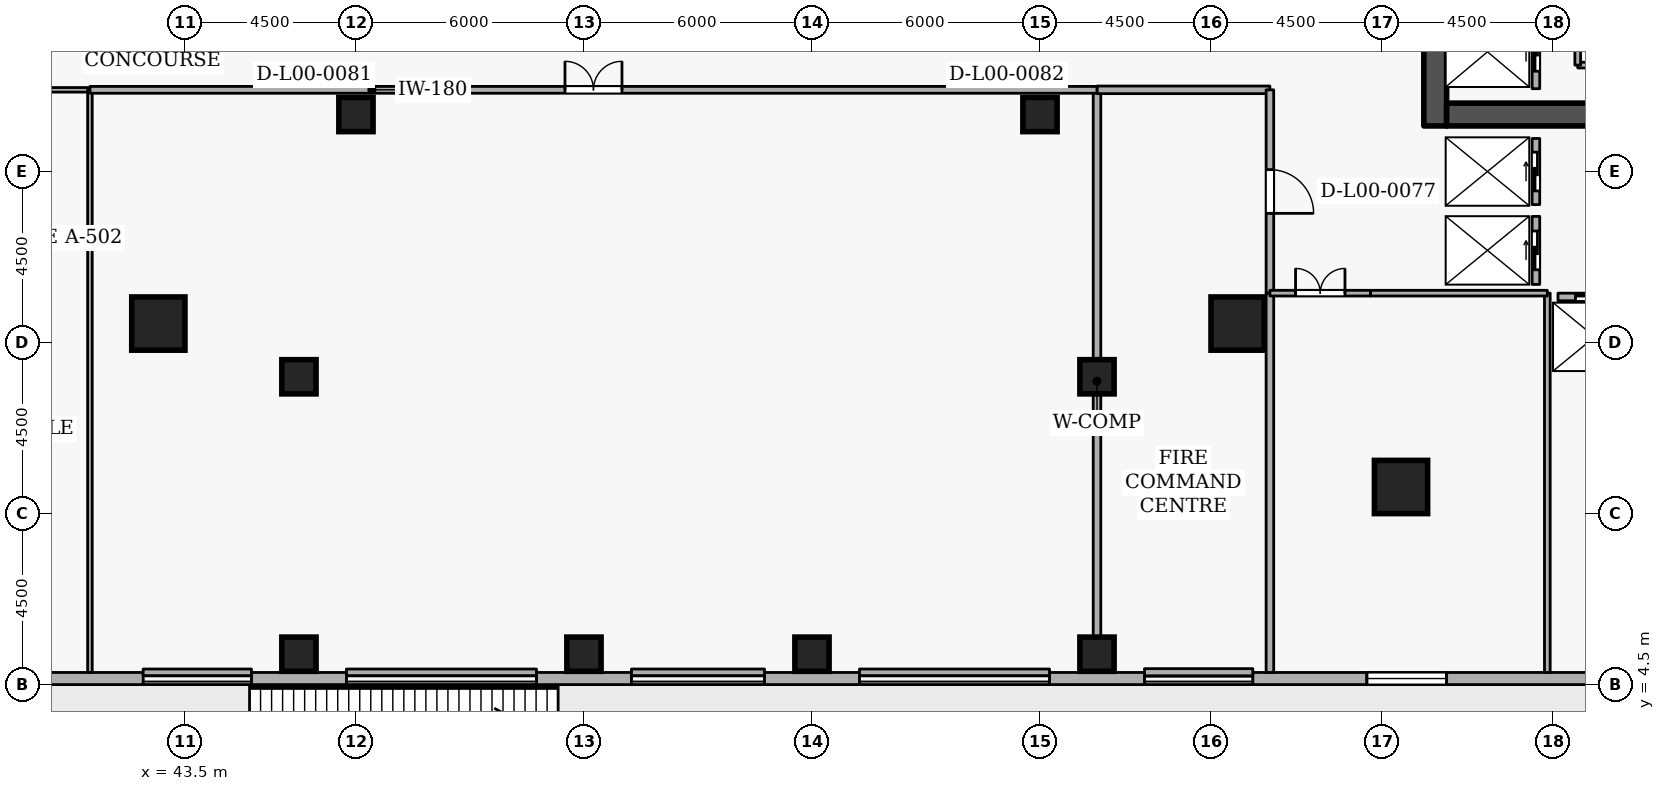
"""IFC4 building model, lengths in metres.
Left out: names, types, materials, properties, quantities, classifications, styles, units other than length and angle.
Written with IfcOpenShell. Run it as: python <this file> out.ifc"""

import sys

from ifc_helpers import new_model, si_unit, direction, frame, frame_2d, origin, origin_2d, place, context, subcontext, project, spatial, rectangle, extrude, element, fill, save


model = new_model("IFC4")
c1 = context("Model", 3, precision=1e-05, world=origin(), true_north=direction((0.0, 1.0)))
c2 = subcontext(c1, "Body", "Model", "MODEL_VIEW")
j1 = project(units=[si_unit("LENGTHUNIT", "METRE"), si_unit("PLANEANGLEUNIT", "RADIAN")], contexts=[c1])
p1 = place(None, origin())
s1 = spatial("IfcSite", under=j1, at=p1, CompositionType="ELEMENT")
p2 = place(p1, origin())
s2 = spatial("IfcBuilding", under=s1, at=p2, CompositionType="ELEMENT")
p3 = place(p2, origin())
s3 = spatial("IfcBuildingStorey", under=s2, at=p3, CompositionType="ELEMENT", Elevation=0.0)
p4 = place(p3, frame((76.4, 19.2, 0.0), z_axis=(0.0, 0.0, 1.0), x_axis=(0.0, 1.0, 0.0)))
e1 = element("IfcWall", 1, at=p4, inside=s3, PredefinedType="SHEAR", context=c2, shape_type="SweptSolid", body=[
    extrude(rectangle(XDim=15.6, YDim=0.6, at=frame_2d((7.8, 0.0))), origin(), (0.0, 0.0, 1.0), 4.8),
])
p5 = place(p3, frame((76.7, 19.5, 0.0), z_axis=(0.0, 0.0, 1.0), x_axis=(1.0, 0.0, 0.0)))
e2 = element("IfcWall", 2, at=p5, inside=s3, PredefinedType="SHEAR", context=c2, shape_type="SweptSolid", body=[
    extrude(rectangle(XDim=5.7, YDim=0.6, at=frame_2d((2.85, 0.0))), origin(), (0.0, 0.0, 1.0), 4.8),
])
for number, where, z_axis, x_axis in (
    (3, (42.8, 14.0, 0.0), (0.0, 0.0, 1.0), (1.0, 0.0, 0.0)),
    (4, (71.2, 14.0, 0.0), (0.0, 0.0, 1.0), (1.0, 0.0, 0.0)),
    (5, (75.5, 9.7, 0.0), (0.0, 0.0, 1.0), (1.0, 0.0, 0.0)),
):
    element("IfcColumn", number, at=place(p3, frame(where, z_axis=z_axis, x_axis=x_axis)), inside=s3, PredefinedType="COLUMN", context=c2, shape_type="SweptSolid", body=[
        extrude(rectangle(XDim=1.4, YDim=1.4, at=origin_2d()), origin(), (0.0, 0.0, 1.0), 4.8),
    ])
for number, where, z_axis, x_axis in (
    (6, (46.5, 5.3, 0.0), (0.0, 0.0, 1.0), (1.0, 0.0, 0.0)),
    (7, (54.0, 5.3, 0.0), (0.0, 0.0, 1.0), (1.0, 0.0, 0.0)),
    (8, (60.0, 5.3, 0.0), (0.0, 0.0, 1.0), (1.0, 0.0, 0.0)),
    (9, (67.5, 5.3, 0.0), (0.0, 0.0, 1.0), (1.0, 0.0, 0.0)),
    (10, (46.5, 12.6, 0.0), (0.0, 0.0, 1.0), (1.0, 0.0, 0.0)),
    (11, (67.5, 12.6, 0.0), (0.0, 0.0, 1.0), (1.0, 0.0, 0.0)),
    (12, (48.0, 19.5, 0.0), (0.0, 0.0, 1.0), (1.0, 0.0, 0.0)),
    (13, (66.0, 19.5, 0.0), (0.0, 0.0, 1.0), (1.0, 0.0, 0.0)),
):
    element("IfcColumn", number, at=place(p3, frame(where, z_axis=z_axis, x_axis=x_axis)), inside=s3, PredefinedType="COLUMN", context=c2, shape_type="SweptSolid", body=[
        extrude(rectangle(XDim=0.9, YDim=0.9, at=origin_2d()), origin(), (0.0, 0.0, 1.0), 4.8),
    ])
for number, where, z_axis, x_axis in (
    (14, (45.25, 4.66, 0.0), (0.0, 0.0, 1.0), (1.0, 0.0, 0.0)),
    (15, (52.75, 4.66, 0.0), (0.0, 0.0, 1.0), (1.0, 0.0, 0.0)),
    (16, (58.75, 4.66, 0.0), (0.0, 0.0, 1.0), (1.0, 0.0, 0.0)),
    (17, (66.25, 4.66, 0.0), (0.0, 0.0, 1.0), (1.0, 0.0, 0.0)),
):
    element("IfcWall", number, at=place(p3, frame(where, z_axis=z_axis, x_axis=x_axis)), inside=s3, PredefinedType="STANDARD", context=c2, shape_type="SweptSolid", body=[
        extrude(rectangle(XDim=2.5, YDim=0.32, at=frame_2d((1.25, 0.0))), origin(), (0.0, 0.0, 1.0), 3.86),
    ])
p6 = place(p3, frame((3.0, 4.66, 0.0), z_axis=(0.0, 0.0, 1.0), x_axis=(1.0, 0.0, 0.0)))
e18 = element("IfcWall", 18, at=p6, inside=s3, PredefinedType="STANDARD", context=c2, shape_type="SweptSolid", body=[
    extrude(rectangle(XDim=39.4, YDim=0.32, at=frame_2d((19.7, 0.0))), origin(), (0.0, 0.0, 1.0), 3.86),
])
p7 = place(p6, frame((14.3, 0.0, 0.0), z_axis=(0.0, 0.0, 1.0), x_axis=(-1.0, 0.0, 0.0)))
e19 = element("IfcOpeningElement", 19, at=p7, cuts=e18, PredefinedType="OPENING", context=c2, shape_type="SweptSolid", body=[
    extrude(rectangle(XDim=1.9, YDim=2.25, at=frame_2d((0.95, 1.125))), frame((0.0, 0.17, 0.0), z_axis=(0.0, -1.0, 0.0), x_axis=(1.0, 0.0, 0.0)), (0.0, 0.0, 1.0), 0.34),
])
p8 = place(p6, frame((9.1, 0.0, 0.0), z_axis=(0.0, 0.0, 1.0), x_axis=(-1.0, 0.0, 0.0)))
e20 = element("IfcOpeningElement", 20, at=p8, cuts=e18, PredefinedType="OPENING", context=c2, shape_type="SweptSolid", body=[
    extrude(rectangle(XDim=1.9, YDim=2.25, at=frame_2d((0.95, 1.125))), frame((0.0, 0.17, 0.0), z_axis=(0.0, -1.0, 0.0), x_axis=(1.0, 0.0, 0.0)), (0.0, 0.0, 1.0), 0.34),
])
p9 = place(p6, frame((35.1, 0.0, 0.0), z_axis=(0.0, 0.0, 1.0), x_axis=(-1.0, 0.0, 0.0)))
e21 = element("IfcOpeningElement", 21, at=p9, cuts=e18, PredefinedType="OPENING", context=c2, shape_type="SweptSolid", body=[
    extrude(rectangle(XDim=1.9, YDim=2.25, at=frame_2d((0.95, 1.125))), frame((0.0, 0.17, 0.0), z_axis=(0.0, -1.0, 0.0), x_axis=(1.0, 0.0, 0.0)), (0.0, 0.0, 1.0), 0.34),
])
p10 = place(p6, frame((3.0, 0.0, 0.78)))
e22 = element("IfcOpeningElement", 22, at=p10, cuts=e18, PredefinedType="OPENING", context=c2, shape_type="SweptSolid", body=[
    extrude(rectangle(XDim=2.1, YDim=2.4, at=frame_2d((1.05, 1.2))), frame((0.0, 0.17, 0.0), z_axis=(0.0, -1.0, 0.0), x_axis=(1.0, 0.0, 0.0)), (0.0, 0.0, 1.0), 0.34),
])
p11 = place(p6, frame((22.8, 0.0, 0.78)))
e23 = element("IfcOpeningElement", 23, at=p11, cuts=e18, PredefinedType="OPENING", context=c2, shape_type="SweptSolid", body=[
    extrude(rectangle(XDim=2.1, YDim=2.4, at=frame_2d((1.05, 1.2))), frame((0.0, 0.17, 0.0), z_axis=(0.0, -1.0, 0.0), x_axis=(1.0, 0.0, 0.0)), (0.0, 0.0, 1.0), 0.34),
])
p12 = place(p3, frame((71.6, 4.66, 0.0), z_axis=(0.0, 0.0, 1.0), x_axis=(1.0, 0.0, 0.0)))
e24 = element("IfcWall", 24, at=p12, inside=s3, PredefinedType="STANDARD", context=c2, shape_type="SweptSolid", body=[
    extrude(rectangle(XDim=39.4, YDim=0.32, at=frame_2d((19.7, 0.0))), origin(), (0.0, 0.0, 1.0), 3.86),
])
p13 = place(p12, frame((25.83, 0.0, 0.0), z_axis=(0.0, 0.0, 1.0), x_axis=(-1.0, 0.0, 0.0)))
e25 = element("IfcOpeningElement", 25, at=p13, cuts=e24, PredefinedType="OPENING", context=c2, shape_type="SweptSolid", body=[
    extrude(rectangle(XDim=1.9, YDim=2.25, at=frame_2d((0.95, 1.125))), frame((0.0, 0.17, 0.0), z_axis=(0.0, -1.0, 0.0), x_axis=(1.0, 0.0, 0.0)), (0.0, 0.0, 1.0), 0.34),
])
p14 = place(p12, frame((15.7, 0.0, 0.0), z_axis=(0.0, 0.0, 1.0), x_axis=(-1.0, 0.0, 0.0)))
e26 = element("IfcOpeningElement", 26, at=p14, cuts=e24, PredefinedType="OPENING", context=c2, shape_type="SweptSolid", body=[
    extrude(rectangle(XDim=1.9, YDim=2.25, at=frame_2d((0.95, 1.125))), frame((0.0, 0.17, 0.0), z_axis=(0.0, -1.0, 0.0), x_axis=(1.0, 0.0, 0.0)), (0.0, 0.0, 1.0), 0.34),
])
p15 = place(p12, frame((35.7, 0.0, 0.0), z_axis=(0.0, 0.0, 1.0), x_axis=(-1.0, 0.0, 0.0)))
e27 = element("IfcOpeningElement", 27, at=p15, cuts=e24, PredefinedType="OPENING", context=c2, shape_type="SweptSolid", body=[
    extrude(rectangle(XDim=1.9, YDim=2.25, at=frame_2d((0.95, 1.125))), frame((0.0, 0.17, 0.0), z_axis=(0.0, -1.0, 0.0), x_axis=(1.0, 0.0, 0.0)), (0.0, 0.0, 1.0), 0.34),
])
p16 = place(p12, frame((3.0, 0.0, 0.78)))
e28 = element("IfcOpeningElement", 28, at=p16, cuts=e24, PredefinedType="OPENING", context=c2, shape_type="SweptSolid", body=[
    extrude(rectangle(XDim=2.1, YDim=2.4, at=frame_2d((1.05, 1.2))), frame((0.0, 0.17, 0.0), z_axis=(0.0, -1.0, 0.0), x_axis=(1.0, 0.0, 0.0)), (0.0, 0.0, 1.0), 0.34),
])
p17 = place(p3, frame((79.05, 20.18, 0.0), z_axis=(0.0, 0.0, 1.0), x_axis=(0.0, 1.0, 0.0)))
e29 = element("IfcWall", 29, at=p17, inside=s3, PredefinedType="STANDARD", context=c2, shape_type="SweptSolid", body=[
    extrude(rectangle(XDim=1.94, YDim=0.2, at=frame_2d((0.97, 0.0))), origin(), (0.0, 0.0, 1.0), 4.46),
])
p18 = place(p17, frame((0.46, 0.0, 0.0)))
e30 = element("IfcOpeningElement", 30, at=p18, cuts=e29, PredefinedType="OPENING", context=c2, shape_type="SweptSolid", body=[
    extrude(rectangle(XDim=1.02, YDim=2.06, at=frame_2d((0.51, 1.03))), frame((0.0, 0.11, 0.0), z_axis=(0.0, -1.0, 0.0), x_axis=(1.0, 0.0, 0.0)), (0.0, 0.0, 1.0), 0.22),
])
p19 = place(p3, frame((79.05, 17.13, 0.0), z_axis=(0.0, 0.0, 1.0), x_axis=(0.0, 1.0, 0.0)))
e31 = element("IfcWall", 31, at=p19, inside=s3, PredefinedType="STANDARD", context=c2, shape_type="SweptSolid", body=[
    extrude(rectangle(XDim=1.74, YDim=0.2, at=frame_2d((0.87, 0.0))), origin(), (0.0, 0.0, 1.0), 4.46),
])
p20 = place(p19, frame((0.36, 0.0, 0.0)))
e32 = element("IfcOpeningElement", 32, at=p20, cuts=e31, PredefinedType="OPENING", context=c2, shape_type="SweptSolid", body=[
    extrude(rectangle(XDim=1.02, YDim=2.06, at=frame_2d((0.51, 1.03))), frame((0.0, 0.11, 0.0), z_axis=(0.0, -1.0, 0.0), x_axis=(1.0, 0.0, 0.0)), (0.0, 0.0, 1.0), 0.22),
])
p21 = place(p3, frame((79.05, 15.03, 0.0), z_axis=(0.0, 0.0, 1.0), x_axis=(0.0, 1.0, 0.0)))
e33 = element("IfcWall", 33, at=p21, inside=s3, PredefinedType="STANDARD", context=c2, shape_type="SweptSolid", body=[
    extrude(rectangle(XDim=1.79, YDim=0.2, at=frame_2d((0.895, 0.0))), origin(), (0.0, 0.0, 1.0), 4.46),
])
p22 = place(p21, frame((0.385, 0.0, 0.0)))
e34 = element("IfcOpeningElement", 34, at=p22, cuts=e33, PredefinedType="OPENING", context=c2, shape_type="SweptSolid", body=[
    extrude(rectangle(XDim=1.02, YDim=2.06, at=frame_2d((0.51, 1.03))), frame((0.0, 0.11, 0.0), z_axis=(0.0, -1.0, 0.0), x_axis=(1.0, 0.0, 0.0)), (0.0, 0.0, 1.0), 0.22),
])
p23 = place(p3, frame((79.63, 14.7, 0.0), z_axis=(0.0, 0.0, 1.0), x_axis=(1.0, 0.0, 0.0)))
e35 = element("IfcWall", 35, at=p23, inside=s3, PredefinedType="STANDARD", context=c2, shape_type="SweptSolid", body=[
    extrude(rectangle(XDim=1.94, YDim=0.2, at=frame_2d((0.97, 0.0))), origin(), (0.0, 0.0, 1.0), 4.46),
])
p24 = place(p23, frame((0.46, 0.0, 0.0)))
e36 = element("IfcOpeningElement", 36, at=p24, cuts=e35, PredefinedType="OPENING", context=c2, shape_type="SweptSolid", body=[
    extrude(rectangle(XDim=1.02, YDim=2.06, at=frame_2d((0.51, 1.03))), frame((0.0, 0.11, 0.0), z_axis=(0.0, -1.0, 0.0), x_axis=(1.0, 0.0, 0.0)), (0.0, 0.0, 1.0), 0.22),
])
p25 = place(p3, frame((71.6, 4.82, 0.0), z_axis=(0.0, 0.0, 1.0), x_axis=(-1.0, 0.0, 0.0)))
e37 = element("IfcWall", 37, at=p25, inside=s3, PredefinedType="STANDARD", context=c2, shape_type="SweptSolid", body=[
    extrude(rectangle(XDim=2.85, YDim=0.2, at=frame_2d((1.425, 0.0))), origin(), (0.0, 0.0, 1.0), 4.46),
])
p26 = place(p3, frame((67.5, 4.82, 0.0), z_axis=(0.0, 0.0, 1.0), x_axis=(0.0, 1.0, 0.0)))
e38 = element("IfcWall", 38, at=p26, inside=s3, PredefinedType="STANDARD", context=c2, shape_type="SweptSolid", body=[
    extrude(rectangle(XDim=15.33, YDim=0.2, at=frame_2d((7.665, 0.0))), origin(), (0.0, 0.0, 1.0), 3.538),
])
p27 = place(p3, frame((67.5, 20.15, 0.0), z_axis=(0.0, 0.0, 1.0), x_axis=(1.0, 0.0, 0.0)))
e39 = element("IfcWall", 39, at=p27, inside=s3, PredefinedType="STANDARD", context=c2, shape_type="SweptSolid", body=[
    extrude(rectangle(XDim=4.55, YDim=0.2, at=frame_2d((2.275, 0.0))), origin(), (0.0, 0.0, 1.0), 4.46),
])
p28 = place(p3, frame((72.05, 20.15, 0.0), z_axis=(0.0, 0.0, 1.0), x_axis=(0.0, -1.0, 0.0)))
e40 = element("IfcWall", 40, at=p28, inside=s3, PredefinedType="STANDARD", context=c2, shape_type="SweptSolid", body=[
    extrude(rectangle(XDim=5.35, YDim=0.2, at=frame_2d((2.675, 0.0))), origin(), (0.0, 0.0, 1.0), 4.46),
])
p29 = place(p28, frame((2.1, 0.0, 0.0)))
e41 = element("IfcOpeningElement", 41, at=p29, cuts=e40, PredefinedType="OPENING", context=c2, shape_type="SweptSolid", body=[
    extrude(rectangle(XDim=1.15, YDim=2.1, at=frame_2d((0.575, 1.05))), frame((0.0, 0.11, 0.0), z_axis=(0.0, -1.0, 0.0), x_axis=(1.0, 0.0, 0.0)), (0.0, 0.0, 1.0), 0.22),
])
p30 = place(p3, frame((72.05, 14.8, 0.0), z_axis=(0.0, 0.0, 1.0), x_axis=(0.0, -1.0, 0.0)))
e42 = element("IfcWall", 42, at=p30, inside=s3, PredefinedType="STANDARD", context=c2, shape_type="SweptSolid", body=[
    extrude(rectangle(XDim=9.98, YDim=0.2, at=frame_2d((4.99, 0.0))), origin(), (0.0, 0.0, 1.0), 4.46),
])
p31 = place(p3, frame((81.65, 20.8, 0.0), z_axis=(0.0, 0.0, 1.0), x_axis=(-1.0, 0.0, 0.0)))
e43 = element("IfcWall", 43, at=p31, inside=s3, PredefinedType="PARTITIONING", context=c2, shape_type="SweptSolid", body=[
    extrude(rectangle(XDim=1.5, YDim=0.15, at=frame_2d((0.75, 0.0))), origin(), (0.0, 0.0, 1.0), 4.46),
])
p32 = place(p3, frame((80.15, 20.8, 0.0), z_axis=(0.0, 0.0, 1.0), x_axis=(0.0, 1.0, 0.0)))
e44 = element("IfcWall", 44, at=p32, inside=s3, PredefinedType="PARTITIONING", context=c2, shape_type="SweptSolid", body=[
    extrude(rectangle(XDim=3.25, YDim=0.15, at=frame_2d((1.625, 0.0))), origin(), (0.0, 0.0, 1.0), 4.46),
])
p33 = place(p3, frame((33.5, 20.15, 0.0), z_axis=(0.0, 0.0, 1.0), x_axis=(1.0, 0.0, 0.0)))
e45 = element("IfcWall", 45, at=p33, inside=s3, PredefinedType="PARTITIONING", context=c2, shape_type="SweptSolid", body=[
    extrude(rectangle(XDim=7.5, YDim=0.12, at=frame_2d((3.75, 0.0))), origin(), (0.0, 0.0, 1.0), 4.46),
])
p34 = place(p33, frame((3.225, 0.0, 0.0)))
e46 = element("IfcOpeningElement", 46, at=p34, cuts=e45, PredefinedType="OPENING", context=c2, shape_type="SweptSolid", body=[
    extrude(rectangle(XDim=1.05, YDim=2.1, at=frame_2d((0.525, 1.05))), frame((0.0, 0.07, 0.0), z_axis=(0.0, -1.0, 0.0), x_axis=(1.0, 0.0, 0.0)), (0.0, 0.0, 1.0), 0.14),
])
p35 = place(p3, frame((41.0, 20.15, 0.0), z_axis=(0.0, 0.0, 1.0), x_axis=(0.0, -1.0, 0.0)))
e47 = element("IfcWall", 47, at=p35, inside=s3, PredefinedType="PARTITIONING", context=c2, shape_type="SweptSolid", body=[
    extrude(rectangle(XDim=15.33, YDim=0.12, at=frame_2d((7.665, 0.0))), origin(), (0.0, 0.0, 1.0), 4.46),
])
p36 = place(p3, frame((66.25, 4.82, 0.0), z_axis=(0.0, 0.0, 1.0), x_axis=(-1.0, 0.0, 0.0)))
e48 = element("IfcWall", 48, at=p36, inside=s3, PredefinedType="PARTITIONING", context=c2, shape_type="SweptSolid", body=[
    extrude(rectangle(XDim=5.0, YDim=0.18, at=frame_2d((2.5, 0.0))), origin(), (0.0, 0.0, 1.0), 4.46),
])
p37 = place(p3, frame((58.75, 4.82, 0.0), z_axis=(0.0, 0.0, 1.0), x_axis=(-1.0, 0.0, 0.0)))
e49 = element("IfcWall", 49, at=p37, inside=s3, PredefinedType="PARTITIONING", context=c2, shape_type="SweptSolid", body=[
    extrude(rectangle(XDim=3.5, YDim=0.18, at=frame_2d((1.75, 0.0))), origin(), (0.0, 0.0, 1.0), 4.46),
])
p38 = place(p3, frame((52.75, 4.82, 0.0), z_axis=(0.0, 0.0, 1.0), x_axis=(-1.0, 0.0, 0.0)))
e50 = element("IfcWall", 50, at=p38, inside=s3, PredefinedType="PARTITIONING", context=c2, shape_type="SweptSolid", body=[
    extrude(rectangle(XDim=5.0, YDim=0.18, at=frame_2d((2.5, 0.0))), origin(), (0.0, 0.0, 1.0), 4.46),
])
p39 = place(p3, frame((45.25, 4.82, 0.0), z_axis=(0.0, 0.0, 1.0), x_axis=(-1.0, 0.0, 0.0)))
e51 = element("IfcWall", 51, at=p39, inside=s3, PredefinedType="PARTITIONING", context=c2, shape_type="SweptSolid", body=[
    extrude(rectangle(XDim=2.85, YDim=0.18, at=frame_2d((1.425, 0.0))), origin(), (0.0, 0.0, 1.0), 4.46),
])
p40 = place(p3, frame((41.0, 20.15, 0.0), z_axis=(0.0, 0.0, 1.0), x_axis=(1.0, 0.0, 0.0)))
e52 = element("IfcWall", 52, at=p40, inside=s3, PredefinedType="PARTITIONING", context=c2, shape_type="SweptSolid", body=[
    extrude(rectangle(XDim=26.5, YDim=0.18, at=frame_2d((13.25, 0.0))), origin(), (0.0, 0.0, 1.0), 4.46),
])
p41 = place(p40, frame((12.5, 0.0, 0.0)))
e53 = element("IfcOpeningElement", 53, at=p41, cuts=e52, PredefinedType="OPENING", context=c2, shape_type="SweptSolid", body=[
    extrude(rectangle(XDim=1.5, YDim=2.15, at=frame_2d((0.75, 1.075))), frame((0.0, 0.1, 0.0), z_axis=(0.0, -1.0, 0.0), x_axis=(1.0, 0.0, 0.0)), (0.0, 0.0, 1.0), 0.2),
])
p42 = place(p3, frame((79.35, 14.8, 0.0), z_axis=(0.0, 0.0, 1.0), x_axis=(0.0, -1.0, 0.0)))
e54 = element("IfcWall", 54, at=p42, inside=s3, PredefinedType="PARTITIONING", context=c2, shape_type="SweptSolid", body=[
    extrude(rectangle(XDim=9.98, YDim=0.15, at=frame_2d((4.99, 0.0))), origin(), (0.0, 0.0, 1.0), 4.46),
])
p43 = place(p3, frame((72.05, 14.8, 0.0), z_axis=(0.0, 0.0, 1.0), x_axis=(1.0, 0.0, 0.0)))
e55 = element("IfcWall", 55, at=p43, inside=s3, PredefinedType="PARTITIONING", context=c2, shape_type="SweptSolid", body=[
    extrude(rectangle(XDim=2.65, YDim=0.15, at=frame_2d((1.325, 0.0))), origin(), (0.0, 0.0, 1.0), 4.46),
])
p44 = place(p43, frame((0.675, 0.0, 0.0)))
e56 = element("IfcOpeningElement", 56, at=p44, cuts=e55, PredefinedType="OPENING", context=c2, shape_type="SweptSolid", body=[
    extrude(rectangle(XDim=1.3, YDim=2.12, at=frame_2d((0.65, 1.06))), frame((0.0, 0.085, 0.0), z_axis=(0.0, -1.0, 0.0), x_axis=(1.0, 0.0, 0.0)), (0.0, 0.0, 1.0), 0.17),
])
p45 = place(p3, frame((74.7, 14.8, 0.0), z_axis=(0.0, 0.0, 1.0), x_axis=(1.0, 0.0, 0.0)))
e57 = element("IfcWall", 57, at=p45, inside=s3, PredefinedType="PARTITIONING", context=c2, shape_type="SweptSolid", body=[
    extrude(rectangle(XDim=4.65, YDim=0.15, at=frame_2d((2.325, 0.0))), origin(), (0.0, 0.0, 1.0), 4.46),
])
p46 = place(p16, origin())
e58 = element("IfcWindow", 58, at=p46, inside=s3, PartitioningType="SINGLE_PANEL", PredefinedType="WINDOW", context=c2, shape_type="SweptSolid", body=[
    extrude(rectangle(XDim=2.1, YDim=2.4, at=frame_2d((1.05, 1.2))), frame((0.0, 0.03, 0.0), z_axis=(0.0, -1.0, 0.0), x_axis=(1.0, 0.0, 0.0)), (0.0, 0.0, 1.0), 0.06),
])
fill(e28, e58)
p47 = place(p18, origin())
e59 = element("IfcDoor", 59, at=p47, inside=s3, OperationType="SLIDING_TO_LEFT", PredefinedType="DOOR", context=c2, shape_type="SweptSolid", body=[
    extrude(rectangle(XDim=1.02, YDim=2.06, at=frame_2d((0.51, 1.03))), frame((0.0, 0.025, 0.0), z_axis=(0.0, -1.0, 0.0), x_axis=(1.0, 0.0, 0.0)), (0.0, 0.0, 1.0), 0.05),
])
fill(e30, e59)
p48 = place(p20, origin())
e60 = element("IfcDoor", 60, at=p48, inside=s3, OperationType="SLIDING_TO_LEFT", PredefinedType="DOOR", context=c2, shape_type="SweptSolid", body=[
    extrude(rectangle(XDim=1.02, YDim=2.06, at=frame_2d((0.51, 1.03))), frame((0.0, 0.025, 0.0), z_axis=(0.0, -1.0, 0.0), x_axis=(1.0, 0.0, 0.0)), (0.0, 0.0, 1.0), 0.05),
])
fill(e32, e60)
p49 = place(p22, origin())
e61 = element("IfcDoor", 61, at=p49, inside=s3, OperationType="SLIDING_TO_LEFT", PredefinedType="DOOR", context=c2, shape_type="SweptSolid", body=[
    extrude(rectangle(XDim=1.02, YDim=2.06, at=frame_2d((0.51, 1.03))), frame((0.0, 0.025, 0.0), z_axis=(0.0, -1.0, 0.0), x_axis=(1.0, 0.0, 0.0)), (0.0, 0.0, 1.0), 0.05),
])
fill(e34, e61)
p50 = place(p24, origin())
e62 = element("IfcDoor", 62, at=p50, inside=s3, OperationType="SLIDING_TO_LEFT", PredefinedType="DOOR", context=c2, shape_type="SweptSolid", body=[
    extrude(rectangle(XDim=1.02, YDim=2.06, at=frame_2d((0.51, 1.03))), frame((0.0, 0.025, 0.0), z_axis=(0.0, -1.0, 0.0), x_axis=(1.0, 0.0, 0.0)), (0.0, 0.0, 1.0), 0.05),
])
fill(e36, e62)
p51 = place(p41, origin())
e63 = element("IfcDoor", 63, at=p51, inside=s3, OperationType="DOUBLE_DOOR_SINGLE_SWING", PredefinedType="DOOR", context=c2, shape_type="SweptSolid", body=[
    extrude(rectangle(XDim=1.5, YDim=2.15, at=frame_2d((0.75, 1.075))), frame((0.0, 0.025, 0.0), z_axis=(0.0, -1.0, 0.0), x_axis=(1.0, 0.0, 0.0)), (0.0, 0.0, 1.0), 0.05),
])
fill(e53, e63)
p52 = place(p29, origin())
e64 = element("IfcDoor", 64, at=p52, inside=s3, OperationType="SINGLE_SWING_RIGHT", PredefinedType="DOOR", context=c2, shape_type="SweptSolid", body=[
    extrude(rectangle(XDim=1.15, YDim=2.1, at=frame_2d((0.575, 1.05))), frame((0.0, 0.025, 0.0), z_axis=(0.0, -1.0, 0.0), x_axis=(1.0, 0.0, 0.0)), (0.0, 0.0, 1.0), 0.05),
])
fill(e41, e64)
p53 = place(p44, origin())
e65 = element("IfcDoor", 65, at=p53, inside=s3, OperationType="DOUBLE_DOOR_SINGLE_SWING", PredefinedType="DOOR", context=c2, shape_type="SweptSolid", body=[
    extrude(rectangle(XDim=1.3, YDim=2.12, at=frame_2d((0.65, 1.06))), frame((0.0, 0.025, 0.0), z_axis=(0.0, -1.0, 0.0), x_axis=(1.0, 0.0, 0.0)), (0.0, 0.0, 1.0), 0.05),
])
fill(e56, e65)
save(model, sys.argv[1])
